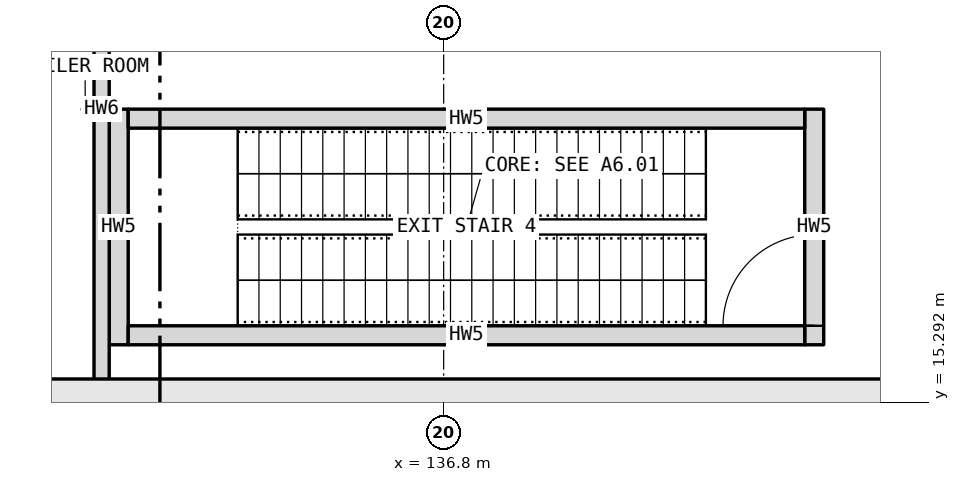
"""IFC4 building model, lengths in metres.
Left out: names, types, materials, properties, quantities, classifications, styles, units other than length and angle.
Written with IfcOpenShell. Run it as: python <this file> out.ifc"""

import sys

from ifc_helpers import new_model, si_unit, direction, frame, frame_2d, origin, place, context, subcontext, project, spatial, rectangle, extrude, element, fill, save


model = new_model("IFC4")
c1 = context("Model", 3, precision=1e-05, world=origin(), true_north=direction((0.0, 1.0)))
c2 = subcontext(c1, "Body", "Model", "MODEL_VIEW")
j1 = project(units=[si_unit("LENGTHUNIT", "METRE"), si_unit("PLANEANGLEUNIT", "RADIAN")], contexts=[c1])
p1 = place(None, origin())
s1 = spatial("IfcSite", under=j1, at=p1, CompositionType="ELEMENT")
p2 = place(p1, origin())
s2 = spatial("IfcBuilding", under=s1, at=p2, CompositionType="ELEMENT")
p3 = place(p2, frame((0.0, 0.0, -8.0)))
s3 = spatial("IfcBuildingStorey", under=s2, at=p3, CompositionType="ELEMENT", Elevation=-8.0)
p4 = place(p3, frame((132.525, 16.05, 0.0), z_axis=(0.0, 0.0, 1.0), x_axis=(0.0, 1.0, 0.0)))
e1 = element("IfcWall", 1, at=p4, inside=s3, PredefinedType="SOLIDWALL", context=c2, shape_type="SweptSolid", body=[
    extrude(rectangle(XDim=3.1, YDim=0.25, at=frame_2d((1.55, 0.0))), origin(), (0.0, 0.0, 1.0), 7.595),
])
p5 = place(p3, frame((141.675, 16.05, 0.0), z_axis=(0.0, 0.0, 1.0), x_axis=(0.0, 1.0, 0.0)))
e2 = element("IfcWall", 2, at=p5, inside=s3, PredefinedType="SOLIDWALL", context=c2, shape_type="SweptSolid", body=[
    extrude(rectangle(XDim=3.1, YDim=0.25, at=frame_2d((1.55, 0.0))), origin(), (0.0, 0.0, 1.0), 7.595),
])
p6 = place(p5, frame((0.25, 0.0, 0.0)))
e3 = element("IfcOpeningElement", 3, at=p6, cuts=e2, PredefinedType="OPENING", context=c2, shape_type="SweptSolid", body=[
    extrude(rectangle(XDim=1.2, YDim=2.1, at=frame_2d((0.6, 1.05))), frame((0.0, 0.135, 0.0), z_axis=(0.0, -1.0, 0.0), x_axis=(1.0, 0.0, 0.0)), (0.0, 0.0, 1.0), 0.27),
])
for number, where, z_axis, x_axis in (
    (4, (132.65, 16.175, 0.0), (0.0, 0.0, 1.0), (1.0, 0.0, 0.0)),
    (5, (132.65, 19.025, 0.0), (0.0, 0.0, 1.0), (1.0, 0.0, 0.0)),
):
    element("IfcWall", number, at=place(p3, frame(where, z_axis=z_axis, x_axis=x_axis)), inside=s3, PredefinedType="SOLIDWALL", context=c2, shape_type="SweptSolid", body=[
        extrude(rectangle(XDim=8.9, YDim=0.25, at=frame_2d((4.45, 0.0))), origin(), (0.0, 0.0, 1.0), 7.595),
    ])
p7 = place(p3, frame((132.3, 14.8, 0.0), z_axis=(0.0, 0.0, 1.0), x_axis=(0.0, 1.0, 0.0)))
e6 = element("IfcWall", 6, at=p7, inside=s3, PredefinedType="PARTITIONING", context=c2, shape_type="SweptSolid", body=[
    extrude(rectangle(XDim=8.7, YDim=0.2, at=frame_2d((4.35, 0.0))), origin(), (0.0, 0.0, 1.0), 7.595),
])
p8 = place(p6, origin())
e7 = element("IfcDoor", 7, at=p8, inside=s3, OperationType="SINGLE_SWING_LEFT", PredefinedType="DOOR", context=c2, shape_type="SweptSolid", body=[
    extrude(rectangle(XDim=1.2, YDim=2.1, at=frame_2d((0.6, 1.05))), frame((0.0, 0.025, 0.0), z_axis=(0.0, -1.0, 0.0), x_axis=(1.0, 0.0, 0.0)), (0.0, 0.0, 1.0), 0.05),
])
fill(e3, e7)
save(model, sys.argv[1])
